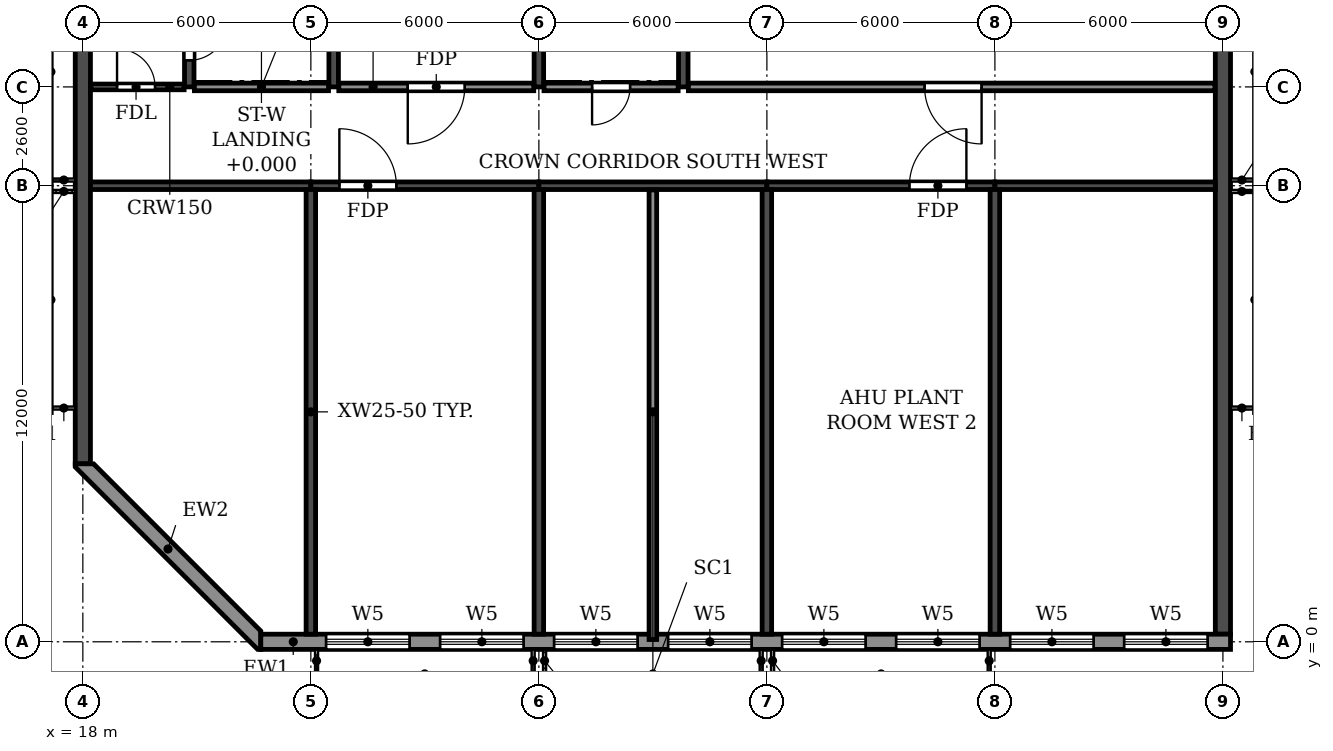
"""IFC4 building model, lengths in metres.
Left out: names, types, materials, properties, quantities, classifications, styles, units other than length and angle.
Written with IfcOpenShell. Run it as: python <this file> out.ifc"""

import sys

from ifc_helpers import new_model, si_unit, direction, frame, frame_2d, origin, place, context, subcontext, project, spatial, polyline, rectangle, outline, extrude, element, fill, save


model = new_model("IFC4")
c1 = context("Model", 3, precision=1e-05, world=origin(), true_north=direction((0.0, 1.0)))
c2 = subcontext(c1, "Body", "Model", "MODEL_VIEW")
j1 = project(units=[si_unit("LENGTHUNIT", "METRE"), si_unit("PLANEANGLEUNIT", "RADIAN")], contexts=[c1])
p1 = place(None, origin())
s1 = spatial("IfcSite", under=j1, at=p1, CompositionType="ELEMENT")
p2 = place(p1, origin())
s2 = spatial("IfcBuilding", under=s1, at=p2, CompositionType="ELEMENT")
p3 = place(p2, frame((0.0, 0.0, 285.6)))
s3 = spatial("IfcBuildingStorey", under=s2, at=p3, CompositionType="ELEMENT", Elevation=285.6)
for number, where, z_axis, x_axis in (
    (1, (24.0, 0.2, 0.0), (0.0, 0.0, 1.0), (0.0, 1.0, 0.0)),
    (2, (30.0, 0.2, 0.0), (0.0, 0.0, 1.0), (0.0, 1.0, 0.0)),
    (3, (36.0, 0.2, 0.0), (0.0, 0.0, 1.0), (0.0, 1.0, 0.0)),
    (4, (42.0, 0.2, 0.0), (0.0, 0.0, 1.0), (0.0, 1.0, 0.0)),
):
    element("IfcWall", number, at=place(p3, frame(where, z_axis=z_axis, x_axis=x_axis)), inside=s3, PredefinedType="SHEAR", context=c2, shape_type="SweptSolid", body=[
        extrude(rectangle(XDim=11.7, YDim=0.25, at=frame_2d((5.85, 0.0))), origin(), (0.0, 0.0, 1.0), 3.05),
    ])
p4 = place(p3, frame((18.0, 4.683, 0.0), z_axis=(0.0, 0.0, 1.0), x_axis=(0.0, 1.0, 0.0)))
e5 = element("IfcWall", 5, at=p4, inside=s3, PredefinedType="SHEAR", context=c2, shape_type="SweptSolid", body=[
    extrude(rectangle(XDim=31.834, YDim=0.4, at=frame_2d((15.917, 0.0))), origin(), (0.0, 0.0, 1.0), 3.05),
])
p5 = place(p3, frame((48.0, 0.2, 0.0), z_axis=(0.0, 0.0, 1.0), x_axis=(0.0, 1.0, 0.0)))
e6 = element("IfcWall", 6, at=p5, inside=s3, PredefinedType="SHEAR", context=c2, shape_type="SweptSolid", body=[
    extrude(rectangle(XDim=40.8, YDim=0.4, at=frame_2d((20.4, 0.0))), origin(), (0.0, 0.0, 1.0), 3.05),
])
p6 = place(p3, frame((18.2, 12.0, 0.0), z_axis=(0.0, 0.0, 1.0), x_axis=(1.0, 0.0, 0.0)))
e7 = element("IfcWall", 7, at=p6, inside=s3, PredefinedType="SHEAR", context=c2, shape_type="SweptSolid", body=[
    extrude(rectangle(XDim=5.8, YDim=0.2, at=frame_2d((2.9, 0.0))), origin(), (0.0, 0.0, 1.0), 2.45),
])
p7 = place(p3, frame((24.0, 12.0, 0.0), z_axis=(0.0, 0.0, 1.0), x_axis=(1.0, 0.0, 0.0)))
e8 = element("IfcWall", 8, at=p7, inside=s3, PredefinedType="SHEAR", context=c2, shape_type="SweptSolid", body=[
    extrude(rectangle(XDim=6.0, YDim=0.2, at=frame_2d((3.0, 0.0))), origin(), (0.0, 0.0, 1.0), 2.45),
])
p8 = place(p7, frame((0.75, 0.0, 0.0)))
e9 = element("IfcOpeningElement", 9, at=p8, cuts=e8, PredefinedType="OPENING", context=c2, shape_type="SweptSolid", body=[
    extrude(rectangle(XDim=1.5, YDim=2.1, at=frame_2d((0.75, 1.05))), frame((0.0, 0.11, 0.0), z_axis=(0.0, -1.0, 0.0), x_axis=(1.0, 0.0, 0.0)), (0.0, 0.0, 1.0), 0.22),
])
p9 = place(p3, frame((30.0, 12.0, 0.0), z_axis=(0.0, 0.0, 1.0), x_axis=(1.0, 0.0, 0.0)))
e10 = element("IfcWall", 10, at=p9, inside=s3, PredefinedType="SHEAR", context=c2, shape_type="SweptSolid", body=[
    extrude(rectangle(XDim=6.0, YDim=0.2, at=frame_2d((3.0, 0.0))), origin(), (0.0, 0.0, 1.0), 2.45),
])
p10 = place(p3, frame((36.0, 12.0, 0.0), z_axis=(0.0, 0.0, 1.0), x_axis=(1.0, 0.0, 0.0)))
e11 = element("IfcWall", 11, at=p10, inside=s3, PredefinedType="SHEAR", context=c2, shape_type="SweptSolid", body=[
    extrude(rectangle(XDim=6.0, YDim=0.2, at=frame_2d((3.0, 0.0))), origin(), (0.0, 0.0, 1.0), 2.45),
])
p11 = place(p10, frame((3.75, 0.0, 0.0)))
e12 = element("IfcOpeningElement", 12, at=p11, cuts=e11, PredefinedType="OPENING", context=c2, shape_type="SweptSolid", body=[
    extrude(rectangle(XDim=1.5, YDim=2.1, at=frame_2d((0.75, 1.05))), frame((0.0, 0.11, 0.0), z_axis=(0.0, -1.0, 0.0), x_axis=(1.0, 0.0, 0.0)), (0.0, 0.0, 1.0), 0.22),
])
p12 = place(p3, frame((42.0, 12.0, 0.0), z_axis=(0.0, 0.0, 1.0), x_axis=(1.0, 0.0, 0.0)))
e13 = element("IfcWall", 13, at=p12, inside=s3, PredefinedType="SHEAR", context=c2, shape_type="SweptSolid", body=[
    extrude(rectangle(XDim=5.8, YDim=0.2, at=frame_2d((2.9, 0.0))), origin(), (0.0, 0.0, 1.0), 2.45),
])
p13 = place(p3, frame((20.8, 14.6, 0.0), z_axis=(0.0, 0.0, 1.0), x_axis=(0.0, 1.0, 0.0)))
e14 = element("IfcWall", 14, at=p13, inside=s3, PredefinedType="SOLIDWALL", context=c2, shape_type="SweptSolid", body=[
    extrude(rectangle(XDim=7.875, YDim=0.25, at=frame_2d((3.938, 0.0))), origin(), (0.0, 0.0, 1.0), 3.05),
])
p14 = place(p13, frame((0.7, 0.0, 0.0)))
e15 = element("IfcOpeningElement", 15, at=p14, cuts=e14, PredefinedType="OPENING", context=c2, shape_type="SweptSolid", body=[
    extrude(rectangle(XDim=1.0, YDim=2.1, at=frame_2d((0.5, 1.05))), frame((0.0, 0.135, 0.0), z_axis=(0.0, -1.0, 0.0), x_axis=(1.0, 0.0, 0.0)), (0.0, 0.0, 1.0), 0.27),
])
for number, where, z_axis, x_axis in (
    (16, (24.6, 14.6, 0.0), (0.0, 0.0, 1.0), (0.0, 1.0, 0.0)),
    (17, (30.0, 14.6, 0.0), (0.0, 0.0, 1.0), (0.0, 1.0, 0.0)),
    (18, (33.8, 14.6, 0.0), (0.0, 0.0, 1.0), (0.0, 1.0, 0.0)),
):
    element("IfcWall", number, at=place(p3, frame(where, z_axis=z_axis, x_axis=x_axis)), inside=s3, PredefinedType="SOLIDWALL", context=c2, shape_type="SweptSolid", body=[
        extrude(rectangle(XDim=7.875, YDim=0.25, at=frame_2d((3.938, 0.0))), origin(), (0.0, 0.0, 1.0), 3.05),
    ])
p15 = place(p3, frame((22.683, 0.0, 0.0), z_axis=(0.0, 0.0, 1.0), x_axis=(1.0, 0.0, 0.0)))
e19 = element("IfcWall", 19, at=p15, inside=s3, PredefinedType="STANDARD", context=c2, shape_type="SweptSolid", body=[
    extrude(rectangle(XDim=25.517, YDim=0.4, at=frame_2d((12.759, 0.0))), origin(), (0.0, 0.0, 1.0), 3.05),
])
p16 = place(p15, frame((1.717, 0.0, 0.6)))
e20 = element("IfcOpeningElement", 20, at=p16, cuts=e19, PredefinedType="OPENING", context=c2, shape_type="SweptSolid", body=[
    extrude(rectangle(XDim=2.2, YDim=2.4, at=frame_2d((1.1, 1.2))), frame((0.0, 0.21, 0.0), z_axis=(0.0, -1.0, 0.0), x_axis=(1.0, 0.0, 0.0)), (0.0, 0.0, 1.0), 0.42),
])
p17 = place(p15, frame((4.717, 0.0, 0.6)))
e21 = element("IfcOpeningElement", 21, at=p17, cuts=e19, PredefinedType="OPENING", context=c2, shape_type="SweptSolid", body=[
    extrude(rectangle(XDim=2.2, YDim=2.4, at=frame_2d((1.1, 1.2))), frame((0.0, 0.21, 0.0), z_axis=(0.0, -1.0, 0.0), x_axis=(1.0, 0.0, 0.0)), (0.0, 0.0, 1.0), 0.42),
])
p18 = place(p15, frame((7.717, 0.0, 0.6)))
e22 = element("IfcOpeningElement", 22, at=p18, cuts=e19, PredefinedType="OPENING", context=c2, shape_type="SweptSolid", body=[
    extrude(rectangle(XDim=2.2, YDim=2.4, at=frame_2d((1.1, 1.2))), frame((0.0, 0.21, 0.0), z_axis=(0.0, -1.0, 0.0), x_axis=(1.0, 0.0, 0.0)), (0.0, 0.0, 1.0), 0.42),
])
p19 = place(p15, frame((10.717, 0.0, 0.6)))
e23 = element("IfcOpeningElement", 23, at=p19, cuts=e19, PredefinedType="OPENING", context=c2, shape_type="SweptSolid", body=[
    extrude(rectangle(XDim=2.2, YDim=2.4, at=frame_2d((1.1, 1.2))), frame((0.0, 0.21, 0.0), z_axis=(0.0, -1.0, 0.0), x_axis=(1.0, 0.0, 0.0)), (0.0, 0.0, 1.0), 0.42),
])
p20 = place(p15, frame((13.717, 0.0, 0.6)))
e24 = element("IfcOpeningElement", 24, at=p20, cuts=e19, PredefinedType="OPENING", context=c2, shape_type="SweptSolid", body=[
    extrude(rectangle(XDim=2.2, YDim=2.4, at=frame_2d((1.1, 1.2))), frame((0.0, 0.21, 0.0), z_axis=(0.0, -1.0, 0.0), x_axis=(1.0, 0.0, 0.0)), (0.0, 0.0, 1.0), 0.42),
])
p21 = place(p15, frame((16.717, 0.0, 0.6)))
e25 = element("IfcOpeningElement", 25, at=p21, cuts=e19, PredefinedType="OPENING", context=c2, shape_type="SweptSolid", body=[
    extrude(rectangle(XDim=2.2, YDim=2.4, at=frame_2d((1.1, 1.2))), frame((0.0, 0.21, 0.0), z_axis=(0.0, -1.0, 0.0), x_axis=(1.0, 0.0, 0.0)), (0.0, 0.0, 1.0), 0.42),
])
p22 = place(p15, frame((19.717, 0.0, 0.6)))
e26 = element("IfcOpeningElement", 26, at=p22, cuts=e19, PredefinedType="OPENING", context=c2, shape_type="SweptSolid", body=[
    extrude(rectangle(XDim=2.2, YDim=2.4, at=frame_2d((1.1, 1.2))), frame((0.0, 0.21, 0.0), z_axis=(0.0, -1.0, 0.0), x_axis=(1.0, 0.0, 0.0)), (0.0, 0.0, 1.0), 0.42),
])
p23 = place(p15, frame((22.717, 0.0, 0.6)))
e27 = element("IfcOpeningElement", 27, at=p23, cuts=e19, PredefinedType="OPENING", context=c2, shape_type="SweptSolid", body=[
    extrude(rectangle(XDim=2.2, YDim=2.4, at=frame_2d((1.1, 1.2))), frame((0.0, 0.21, 0.0), z_axis=(0.0, -1.0, 0.0), x_axis=(1.0, 0.0, 0.0)), (0.0, 0.0, 1.0), 0.42),
])
p24 = place(p3, origin())
e28 = element("IfcWall", 28, at=p24, inside=s3, PredefinedType="STANDARD", context=c2, shape_type="SweptSolid", body=[
    extrude(outline(polyline([(17.8, 4.683), (17.8, 4.6), (22.6, -0.2), (22.683, -0.2), (22.683, 0.283), (18.283, 4.683), (17.8, 4.683)])), origin(), (0.0, 0.0, 1.0), 3.05),
])
p25 = place(p3, frame((18.21, 14.6, 0.0), z_axis=(0.0, 0.0, 1.0), x_axis=(1.0, 0.0, 0.0)))
e29 = element("IfcWall", 29, at=p25, inside=s3, PredefinedType="PARTITIONING", context=c2, shape_type="SweptSolid", body=[
    extrude(rectangle(XDim=2.455, YDim=0.15, at=frame_2d((1.228, 0.0))), origin(), (0.0, 0.0, 1.0), 3.05),
])
p26 = place(p25, frame((0.69, 0.0, 0.0)))
e30 = element("IfcOpeningElement", 30, at=p26, cuts=e29, PredefinedType="OPENING", context=c2, shape_type="SweptSolid", body=[
    extrude(rectangle(XDim=1.0, YDim=2.1, at=frame_2d((0.5, 1.05))), frame((0.0, 0.085, 0.0), z_axis=(0.0, -1.0, 0.0), x_axis=(1.0, 0.0, 0.0)), (0.0, 0.0, 1.0), 0.17),
])
p27 = place(p3, frame((24.735, 14.6, 0.0), z_axis=(0.0, 0.0, 1.0), x_axis=(1.0, 0.0, 0.0)))
e31 = element("IfcWall", 31, at=p27, inside=s3, PredefinedType="PARTITIONING", context=c2, shape_type="SweptSolid", body=[
    extrude(rectangle(XDim=5.13, YDim=0.2, at=frame_2d((2.565, 0.0))), origin(), (0.0, 0.0, 1.0), 3.05),
])
p28 = place(p27, frame((1.815, 0.0, 0.0)))
e32 = element("IfcOpeningElement", 32, at=p28, cuts=e31, PredefinedType="OPENING", context=c2, shape_type="SweptSolid", body=[
    extrude(rectangle(XDim=1.5, YDim=2.1, at=frame_2d((0.75, 1.05))), frame((0.0, 0.11, 0.0), z_axis=(0.0, -1.0, 0.0), x_axis=(1.0, 0.0, 0.0)), (0.0, 0.0, 1.0), 0.22),
])
p29 = place(p3, frame((33.935, 14.6, 0.0), z_axis=(0.0, 0.0, 1.0), x_axis=(1.0, 0.0, 0.0)))
e33 = element("IfcWall", 33, at=p29, inside=s3, PredefinedType="PARTITIONING", context=c2, shape_type="SweptSolid", body=[
    extrude(rectangle(XDim=13.855, YDim=0.2, at=frame_2d((6.927, 0.0))), origin(), (0.0, 0.0, 1.0), 3.05),
])
p30 = place(p29, frame((6.215, 0.0, 0.0)))
e34 = element("IfcOpeningElement", 34, at=p30, cuts=e33, PredefinedType="OPENING", context=c2, shape_type="SweptSolid", body=[
    extrude(rectangle(XDim=1.5, YDim=2.1, at=frame_2d((0.75, 1.05))), frame((0.0, 0.11, 0.0), z_axis=(0.0, -1.0, 0.0), x_axis=(1.0, 0.0, 0.0)), (0.0, 0.0, 1.0), 0.22),
])
p31 = place(p3, frame((33.0, 0.06, 0.0), z_axis=(0.0, 0.0, 1.0), x_axis=(0.0, 1.0, 0.0)))
e35 = element("IfcWall", 35, at=p31, inside=s3, PredefinedType="PARTITIONING", context=c2, shape_type="SweptSolid", body=[
    extrude(rectangle(XDim=11.83, YDim=0.2, at=frame_2d((5.915, 0.0))), origin(), (0.0, 0.0, 1.0), 3.05),
])
p32 = place(p3, frame((20.935, 14.6, 0.0), z_axis=(0.0, 0.0, 1.0), x_axis=(1.0, 0.0, 0.0)))
e36 = element("IfcWall", 36, at=p32, inside=s3, PredefinedType="PARTITIONING", context=c2, shape_type="SweptSolid", body=[
    extrude(rectangle(XDim=3.53, YDim=0.2, at=frame_2d((1.765, 0.0))), origin(), (0.0, 0.0, 1.0), 3.05),
])
p33 = place(p3, frame((30.135, 14.6, 0.0), z_axis=(0.0, 0.0, 1.0), x_axis=(1.0, 0.0, 0.0)))
e37 = element("IfcWall", 37, at=p33, inside=s3, PredefinedType="PARTITIONING", context=c2, shape_type="SweptSolid", body=[
    extrude(rectangle(XDim=3.53, YDim=0.2, at=frame_2d((1.765, 0.0))), origin(), (0.0, 0.0, 1.0), 3.05),
])
p34 = place(p33, frame((1.265, 0.0, 0.0)))
e38 = element("IfcOpeningElement", 38, at=p34, cuts=e37, PredefinedType="OPENING", context=c2, shape_type="SweptSolid", body=[
    extrude(rectangle(XDim=1.0, YDim=2.1, at=frame_2d((0.5, 1.05))), frame((0.0, 0.11, 0.0), z_axis=(0.0, -1.0, 0.0), x_axis=(1.0, 0.0, 0.0)), (0.0, 0.0, 1.0), 0.22),
])
p35 = place(p16, origin())
e39 = element("IfcWindow", 39, at=p35, inside=s3, PartitioningType="TRIPLE_PANEL_HORIZONTAL", PredefinedType="WINDOW", context=c2, shape_type="SweptSolid", body=[
    extrude(rectangle(XDim=2.2, YDim=2.4, at=frame_2d((1.1, 1.2))), frame((0.0, 0.03, 0.0), z_axis=(0.0, -1.0, 0.0), x_axis=(1.0, 0.0, 0.0)), (0.0, 0.0, 1.0), 0.06),
])
fill(e20, e39)
p36 = place(p17, origin())
e40 = element("IfcWindow", 40, at=p36, inside=s3, PartitioningType="TRIPLE_PANEL_HORIZONTAL", PredefinedType="WINDOW", context=c2, shape_type="SweptSolid", body=[
    extrude(rectangle(XDim=2.2, YDim=2.4, at=frame_2d((1.1, 1.2))), frame((0.0, 0.03, 0.0), z_axis=(0.0, -1.0, 0.0), x_axis=(1.0, 0.0, 0.0)), (0.0, 0.0, 1.0), 0.06),
])
fill(e21, e40)
p37 = place(p18, origin())
e41 = element("IfcWindow", 41, at=p37, inside=s3, PartitioningType="TRIPLE_PANEL_HORIZONTAL", PredefinedType="WINDOW", context=c2, shape_type="SweptSolid", body=[
    extrude(rectangle(XDim=2.2, YDim=2.4, at=frame_2d((1.1, 1.2))), frame((0.0, 0.03, 0.0), z_axis=(0.0, -1.0, 0.0), x_axis=(1.0, 0.0, 0.0)), (0.0, 0.0, 1.0), 0.06),
])
fill(e22, e41)
p38 = place(p19, origin())
e42 = element("IfcWindow", 42, at=p38, inside=s3, PartitioningType="TRIPLE_PANEL_HORIZONTAL", PredefinedType="WINDOW", context=c2, shape_type="SweptSolid", body=[
    extrude(rectangle(XDim=2.2, YDim=2.4, at=frame_2d((1.1, 1.2))), frame((0.0, 0.03, 0.0), z_axis=(0.0, -1.0, 0.0), x_axis=(1.0, 0.0, 0.0)), (0.0, 0.0, 1.0), 0.06),
])
fill(e23, e42)
p39 = place(p20, origin())
e43 = element("IfcWindow", 43, at=p39, inside=s3, PartitioningType="TRIPLE_PANEL_HORIZONTAL", PredefinedType="WINDOW", context=c2, shape_type="SweptSolid", body=[
    extrude(rectangle(XDim=2.2, YDim=2.4, at=frame_2d((1.1, 1.2))), frame((0.0, 0.03, 0.0), z_axis=(0.0, -1.0, 0.0), x_axis=(1.0, 0.0, 0.0)), (0.0, 0.0, 1.0), 0.06),
])
fill(e24, e43)
p40 = place(p21, origin())
e44 = element("IfcWindow", 44, at=p40, inside=s3, PartitioningType="TRIPLE_PANEL_HORIZONTAL", PredefinedType="WINDOW", context=c2, shape_type="SweptSolid", body=[
    extrude(rectangle(XDim=2.2, YDim=2.4, at=frame_2d((1.1, 1.2))), frame((0.0, 0.03, 0.0), z_axis=(0.0, -1.0, 0.0), x_axis=(1.0, 0.0, 0.0)), (0.0, 0.0, 1.0), 0.06),
])
fill(e25, e44)
p41 = place(p22, origin())
e45 = element("IfcWindow", 45, at=p41, inside=s3, PartitioningType="TRIPLE_PANEL_HORIZONTAL", PredefinedType="WINDOW", context=c2, shape_type="SweptSolid", body=[
    extrude(rectangle(XDim=2.2, YDim=2.4, at=frame_2d((1.1, 1.2))), frame((0.0, 0.03, 0.0), z_axis=(0.0, -1.0, 0.0), x_axis=(1.0, 0.0, 0.0)), (0.0, 0.0, 1.0), 0.06),
])
fill(e26, e45)
p42 = place(p23, origin())
e46 = element("IfcWindow", 46, at=p42, inside=s3, PartitioningType="TRIPLE_PANEL_HORIZONTAL", PredefinedType="WINDOW", context=c2, shape_type="SweptSolid", body=[
    extrude(rectangle(XDim=2.2, YDim=2.4, at=frame_2d((1.1, 1.2))), frame((0.0, 0.03, 0.0), z_axis=(0.0, -1.0, 0.0), x_axis=(1.0, 0.0, 0.0)), (0.0, 0.0, 1.0), 0.06),
])
fill(e27, e46)
p43 = place(p8, origin())
e47 = element("IfcDoor", 47, at=p43, inside=s3, OperationType="DOUBLE_DOOR_SINGLE_SWING", PredefinedType="DOOR", context=c2, shape_type="SweptSolid", body=[
    extrude(rectangle(XDim=1.5, YDim=2.1, at=frame_2d((0.75, 1.05))), frame((0.0, 0.025, 0.0), z_axis=(0.0, -1.0, 0.0), x_axis=(1.0, 0.0, 0.0)), (0.0, 0.0, 1.0), 0.05),
])
fill(e9, e47)
p44 = place(p28, frame((1.5, 0.0, 0.0), z_axis=(0.0, 0.0, 1.0), x_axis=(-1.0, 0.0, 0.0)))
e48 = element("IfcDoor", 48, at=p44, inside=s3, OperationType="DOUBLE_DOOR_SINGLE_SWING", PredefinedType="DOOR", context=c2, shape_type="SweptSolid", body=[
    extrude(rectangle(XDim=1.5, YDim=2.1, at=frame_2d((0.75, 1.05))), frame((0.0, 0.025, 0.0), z_axis=(0.0, -1.0, 0.0), x_axis=(1.0, 0.0, 0.0)), (0.0, 0.0, 1.0), 0.05),
])
fill(e32, e48)
p45 = place(p11, origin())
e49 = element("IfcDoor", 49, at=p45, inside=s3, OperationType="DOUBLE_DOOR_SINGLE_SWING", PredefinedType="DOOR", context=c2, shape_type="SweptSolid", body=[
    extrude(rectangle(XDim=1.5, YDim=2.1, at=frame_2d((0.75, 1.05))), frame((0.0, 0.025, 0.0), z_axis=(0.0, -1.0, 0.0), x_axis=(1.0, 0.0, 0.0)), (0.0, 0.0, 1.0), 0.05),
])
fill(e12, e49)
p46 = place(p30, frame((1.5, 0.0, 0.0), z_axis=(0.0, 0.0, 1.0), x_axis=(-1.0, 0.0, 0.0)))
e50 = element("IfcDoor", 50, at=p46, inside=s3, OperationType="DOUBLE_DOOR_SINGLE_SWING", PredefinedType="DOOR", context=c2, shape_type="SweptSolid", body=[
    extrude(rectangle(XDim=1.5, YDim=2.1, at=frame_2d((0.75, 1.05))), frame((0.0, 0.025, 0.0), z_axis=(0.0, -1.0, 0.0), x_axis=(1.0, 0.0, 0.0)), (0.0, 0.0, 1.0), 0.05),
])
fill(e34, e50)
p47 = place(p26, origin())
e51 = element("IfcDoor", 51, at=p47, inside=s3, OperationType="SINGLE_SWING_LEFT", PredefinedType="DOOR", context=c2, shape_type="SweptSolid", body=[
    extrude(rectangle(XDim=1.0, YDim=2.1, at=frame_2d((0.5, 1.05))), frame((0.0, 0.025, 0.0), z_axis=(0.0, -1.0, 0.0), x_axis=(1.0, 0.0, 0.0)), (0.0, 0.0, 1.0), 0.05),
])
fill(e30, e51)
p48 = place(p14, frame((1.0, 0.0, 0.0), z_axis=(0.0, 0.0, 1.0), x_axis=(-1.0, 0.0, 0.0)))
e52 = element("IfcDoor", 52, at=p48, inside=s3, OperationType="SINGLE_SWING_LEFT", PredefinedType="DOOR", context=c2, shape_type="SweptSolid", body=[
    extrude(rectangle(XDim=1.0, YDim=2.1, at=frame_2d((0.5, 1.05))), frame((0.0, 0.025, 0.0), z_axis=(0.0, -1.0, 0.0), x_axis=(1.0, 0.0, 0.0)), (0.0, 0.0, 1.0), 0.05),
])
fill(e15, e52)
p49 = place(p34, frame((1.0, 0.0, 0.0), z_axis=(0.0, 0.0, 1.0), x_axis=(-1.0, 0.0, 0.0)))
e53 = element("IfcDoor", 53, at=p49, inside=s3, OperationType="SINGLE_SWING_RIGHT", PredefinedType="DOOR", context=c2, shape_type="SweptSolid", body=[
    extrude(rectangle(XDim=1.0, YDim=2.1, at=frame_2d((0.5, 1.05))), frame((0.0, 0.025, 0.0), z_axis=(0.0, -1.0, 0.0), x_axis=(1.0, 0.0, 0.0)), (0.0, 0.0, 1.0), 0.05),
])
fill(e38, e53)
save(model, sys.argv[1])
